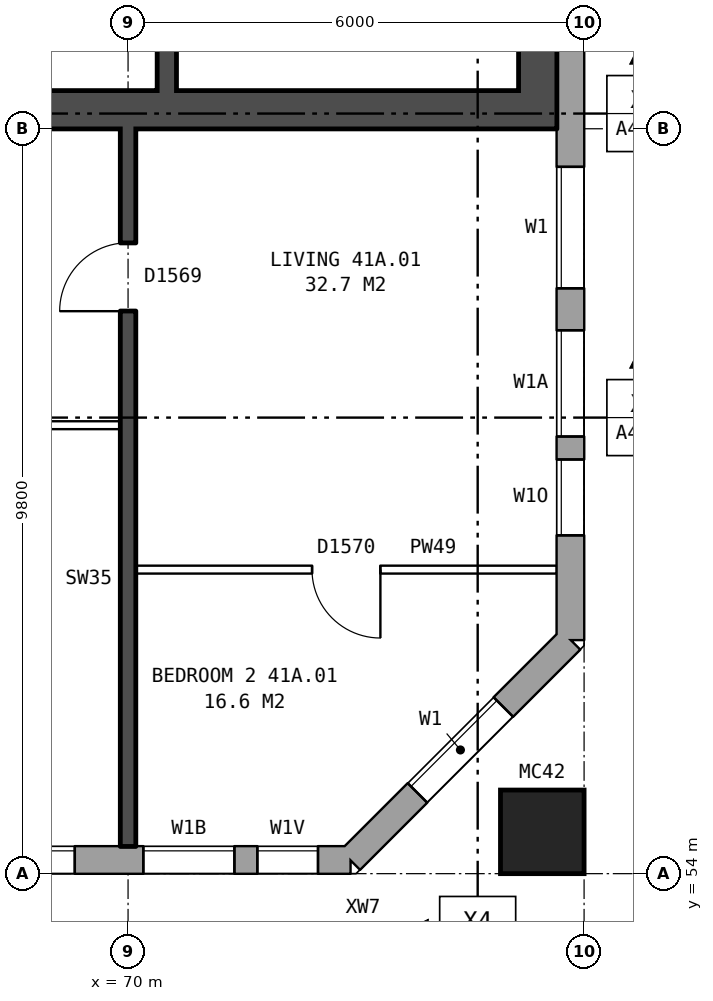
"""IFC4 building model, lengths in metres.
Left out: names, types, materials, properties, quantities, classifications, styles, units other than length and angle.
Written with IfcOpenShell. Run it as: python <this file> out.ifc"""

import sys

from ifc_helpers import new_model, si_unit, direction, frame, frame_2d, origin, origin_2d, place, context, subcontext, project, spatial, rectangle, hollow_rectangle, extrude, element, fill, save


model = new_model("IFC4")
c1 = context("Model", 3, precision=1e-05, world=origin(), true_north=direction((0.0, 1.0)))
c2 = subcontext(c1, "Body", "Model", "MODEL_VIEW")
j1 = project(units=[si_unit("LENGTHUNIT", "METRE"), si_unit("PLANEANGLEUNIT", "RADIAN")], contexts=[c1])
p1 = place(None, origin())
s1 = spatial("IfcSite", under=j1, at=p1, CompositionType="ELEMENT")
p2 = place(p1, origin())
s2 = spatial("IfcBuilding", under=s1, at=p2, CompositionType="ELEMENT")
p3 = place(p2, frame((0.0, 0.0, 148.5)))
s3 = spatial("IfcBuildingStorey", under=s2, at=p3, CompositionType="ELEMENT", Elevation=148.5)
p4 = place(p3, frame((75.45, 54.55, 0.0), z_axis=(0.0, 0.0, 1.0), x_axis=(1.0, 0.0, 0.0)))
e1 = element("IfcColumn", 1, at=p4, inside=s3, PredefinedType="COLUMN", context=c2, shape_type="SweptSolid", body=[
    extrude(hollow_rectangle(XDim=1.1, YDim=1.1, WallThickness=0.06, at=origin_2d()), origin(), (0.0, 0.0, 1.0), 3.1),
])
p5 = place(p3, frame((31.575, 54.18, 0.0), z_axis=(0.0, 0.0, 1.0), x_axis=(1.0, 0.0, 0.0)))
e2 = element("IfcWall", 2, at=p5, inside=s3, PredefinedType="STANDARD", context=c2, shape_type="SweptSolid", body=[
    extrude(rectangle(XDim=41.351, YDim=0.36, at=frame_2d((20.675, 0.0))), origin(), (0.0, 0.0, 1.0), 2.85),
])
p6 = place(p5, frame((3.125, 0.0, 0.8)))
e3 = element("IfcOpeningElement", 3, at=p6, cuts=e2, PredefinedType="OPENING", context=c2, shape_type="SweptSolid", body=[
    extrude(rectangle(XDim=1.6, YDim=1.8, at=frame_2d((0.8, 0.9))), frame((0.0, 0.19, 0.0), z_axis=(0.0, -1.0, 0.0), x_axis=(1.0, 0.0, 0.0)), (0.0, 0.0, 1.0), 0.38),
])
p7 = place(p5, frame((6.125, 0.0, 0.8)))
e4 = element("IfcOpeningElement", 4, at=p7, cuts=e2, PredefinedType="OPENING", context=c2, shape_type="SweptSolid", body=[
    extrude(rectangle(XDim=1.6, YDim=1.8, at=frame_2d((0.8, 0.9))), frame((0.0, 0.19, 0.0), z_axis=(0.0, -1.0, 0.0), x_axis=(1.0, 0.0, 0.0)), (0.0, 0.0, 1.0), 0.38),
])
p8 = place(p5, frame((9.125, 0.0, 0.8)))
e5 = element("IfcOpeningElement", 5, at=p8, cuts=e2, PredefinedType="OPENING", context=c2, shape_type="SweptSolid", body=[
    extrude(rectangle(XDim=1.6, YDim=1.8, at=frame_2d((0.8, 0.9))), frame((0.0, 0.19, 0.0), z_axis=(0.0, -1.0, 0.0), x_axis=(1.0, 0.0, 0.0)), (0.0, 0.0, 1.0), 0.38),
])
p9 = place(p5, frame((12.125, 0.0, 0.8)))
e6 = element("IfcOpeningElement", 6, at=p9, cuts=e2, PredefinedType="OPENING", context=c2, shape_type="SweptSolid", body=[
    extrude(rectangle(XDim=1.6, YDim=1.8, at=frame_2d((0.8, 0.9))), frame((0.0, 0.19, 0.0), z_axis=(0.0, -1.0, 0.0), x_axis=(1.0, 0.0, 0.0)), (0.0, 0.0, 1.0), 0.38),
])
p10 = place(p5, frame((15.125, 0.0, 0.8)))
e7 = element("IfcOpeningElement", 7, at=p10, cuts=e2, PredefinedType="OPENING", context=c2, shape_type="SweptSolid", body=[
    extrude(rectangle(XDim=1.6, YDim=1.8, at=frame_2d((0.8, 0.9))), frame((0.0, 0.19, 0.0), z_axis=(0.0, -1.0, 0.0), x_axis=(1.0, 0.0, 0.0)), (0.0, 0.0, 1.0), 0.38),
])
p11 = place(p5, frame((18.125, 0.0, 0.8)))
e8 = element("IfcOpeningElement", 8, at=p11, cuts=e2, PredefinedType="OPENING", context=c2, shape_type="SweptSolid", body=[
    extrude(rectangle(XDim=1.6, YDim=1.8, at=frame_2d((0.8, 0.9))), frame((0.0, 0.19, 0.0), z_axis=(0.0, -1.0, 0.0), x_axis=(1.0, 0.0, 0.0)), (0.0, 0.0, 1.0), 0.38),
])
p12 = place(p5, frame((21.125, 0.0, 0.8)))
e9 = element("IfcOpeningElement", 9, at=p12, cuts=e2, PredefinedType="OPENING", context=c2, shape_type="SweptSolid", body=[
    extrude(rectangle(XDim=1.6, YDim=1.8, at=frame_2d((0.8, 0.9))), frame((0.0, 0.19, 0.0), z_axis=(0.0, -1.0, 0.0), x_axis=(1.0, 0.0, 0.0)), (0.0, 0.0, 1.0), 0.38),
])
p13 = place(p5, frame((24.125, 0.0, 0.8)))
e10 = element("IfcOpeningElement", 10, at=p13, cuts=e2, PredefinedType="OPENING", context=c2, shape_type="SweptSolid", body=[
    extrude(rectangle(XDim=1.6, YDim=1.8, at=frame_2d((0.8, 0.9))), frame((0.0, 0.19, 0.0), z_axis=(0.0, -1.0, 0.0), x_axis=(1.0, 0.0, 0.0)), (0.0, 0.0, 1.0), 0.38),
])
p14 = place(p5, frame((27.125, 0.0, 0.8)))
e11 = element("IfcOpeningElement", 11, at=p14, cuts=e2, PredefinedType="OPENING", context=c2, shape_type="SweptSolid", body=[
    extrude(rectangle(XDim=1.6, YDim=1.8, at=frame_2d((0.8, 0.9))), frame((0.0, 0.19, 0.0), z_axis=(0.0, -1.0, 0.0), x_axis=(1.0, 0.0, 0.0)), (0.0, 0.0, 1.0), 0.38),
])
p15 = place(p5, frame((30.125, 0.0, 0.8)))
e12 = element("IfcOpeningElement", 12, at=p15, cuts=e2, PredefinedType="OPENING", context=c2, shape_type="SweptSolid", body=[
    extrude(rectangle(XDim=1.6, YDim=1.8, at=frame_2d((0.8, 0.9))), frame((0.0, 0.19, 0.0), z_axis=(0.0, -1.0, 0.0), x_axis=(1.0, 0.0, 0.0)), (0.0, 0.0, 1.0), 0.38),
])
p16 = place(p5, frame((33.125, 0.0, 0.8)))
e13 = element("IfcOpeningElement", 13, at=p16, cuts=e2, PredefinedType="OPENING", context=c2, shape_type="SweptSolid", body=[
    extrude(rectangle(XDim=1.6, YDim=1.8, at=frame_2d((0.8, 0.9))), frame((0.0, 0.19, 0.0), z_axis=(0.0, -1.0, 0.0), x_axis=(1.0, 0.0, 0.0)), (0.0, 0.0, 1.0), 0.38),
])
p17 = place(p5, frame((36.125, 0.0, 0.8)))
e14 = element("IfcOpeningElement", 14, at=p17, cuts=e2, PredefinedType="OPENING", context=c2, shape_type="SweptSolid", body=[
    extrude(rectangle(XDim=1.6, YDim=1.8, at=frame_2d((0.8, 0.9))), frame((0.0, 0.19, 0.0), z_axis=(0.0, -1.0, 0.0), x_axis=(1.0, 0.0, 0.0)), (0.0, 0.0, 1.0), 0.38),
])
p18 = place(p5, frame((38.625, 0.0, 0.8)))
e15 = element("IfcOpeningElement", 15, at=p18, cuts=e2, PredefinedType="OPENING", context=c2, shape_type="SweptSolid", body=[
    extrude(rectangle(XDim=1.2, YDim=1.8, at=frame_2d((0.6, 0.9))), frame((0.0, 0.19, 0.0), z_axis=(0.0, -1.0, 0.0), x_axis=(1.0, 0.0, 0.0)), (0.0, 0.0, 1.0), 0.38),
])
p19 = place(p5, frame((40.125, 0.0, 0.8)))
e16 = element("IfcOpeningElement", 16, at=p19, cuts=e2, PredefinedType="OPENING", context=c2, shape_type="SweptSolid", body=[
    extrude(rectangle(XDim=0.8, YDim=0.9, at=frame_2d((0.4, 0.45))), frame((0.0, 0.19, 0.0), z_axis=(0.0, -1.0, 0.0), x_axis=(1.0, 0.0, 0.0)), (0.0, 0.0, 1.0), 0.38),
])
p20 = place(p3, frame((72.925, 54.18, 0.0), z_axis=(0.0, 0.0, 1.0), x_axis=(0.707106781187, 0.707106781187, 0.0)))
e17 = element("IfcWall", 17, at=p20, inside=s3, PredefinedType="STANDARD", context=c2, shape_type="SweptSolid", body=[
    extrude(rectangle(XDim=4.094, YDim=0.36, at=frame_2d((2.047, 0.0))), origin(), (0.0, 0.0, 1.0), 2.85),
])
p21 = place(p20, frame((1.247, 0.0, 0.8)))
e18 = element("IfcOpeningElement", 18, at=p21, cuts=e17, PredefinedType="OPENING", context=c2, shape_type="SweptSolid", body=[
    extrude(rectangle(XDim=1.6, YDim=1.8, at=frame_2d((0.8, 0.9))), frame((0.0, 0.19, 0.0), z_axis=(0.0, -1.0, 0.0), x_axis=(1.0, 0.0, 0.0)), (0.0, 0.0, 1.0), 0.38),
])
p22 = place(p3, frame((75.82, 57.075, 0.0), z_axis=(0.0, 0.0, 1.0), x_axis=(0.0, 1.0, 0.0)))
e19 = element("IfcWall", 19, at=p22, inside=s3, PredefinedType="STANDARD", context=c2, shape_type="SweptSolid", body=[
    extrude(rectangle(XDim=25.851, YDim=0.36, at=frame_2d((12.925, 0.0))), origin(), (0.0, 0.0, 1.0), 2.85),
])
p23 = place(p22, frame((1.375, 0.0, 0.8)))
e20 = element("IfcOpeningElement", 20, at=p23, cuts=e19, PredefinedType="OPENING", context=c2, shape_type="SweptSolid", body=[
    extrude(rectangle(XDim=1.0, YDim=1.2, at=frame_2d((0.5, 0.6))), frame((0.0, 0.19, 0.0), z_axis=(0.0, -1.0, 0.0), x_axis=(1.0, 0.0, 0.0)), (0.0, 0.0, 1.0), 0.38),
])
p24 = place(p22, frame((4.625, 0.0, 0.8)))
e21 = element("IfcOpeningElement", 21, at=p24, cuts=e19, PredefinedType="OPENING", context=c2, shape_type="SweptSolid", body=[
    extrude(rectangle(XDim=1.6, YDim=1.8, at=frame_2d((0.8, 0.9))), frame((0.0, 0.19, 0.0), z_axis=(0.0, -1.0, 0.0), x_axis=(1.0, 0.0, 0.0)), (0.0, 0.0, 1.0), 0.38),
])
p25 = place(p22, frame((19.625, 0.0, 0.8)))
e22 = element("IfcOpeningElement", 22, at=p25, cuts=e19, PredefinedType="OPENING", context=c2, shape_type="SweptSolid", body=[
    extrude(rectangle(XDim=1.6, YDim=1.8, at=frame_2d((0.8, 0.9))), frame((0.0, 0.19, 0.0), z_axis=(0.0, -1.0, 0.0), x_axis=(1.0, 0.0, 0.0)), (0.0, 0.0, 1.0), 0.38),
])
p26 = place(p22, frame((22.075, 0.0, 0.8)))
e23 = element("IfcOpeningElement", 23, at=p26, cuts=e19, PredefinedType="OPENING", context=c2, shape_type="SweptSolid", body=[
    extrude(rectangle(XDim=1.2, YDim=1.8, at=frame_2d((0.6, 0.9))), frame((0.0, 0.19, 0.0), z_axis=(0.0, -1.0, 0.0), x_axis=(1.0, 0.0, 0.0)), (0.0, 0.0, 1.0), 0.38),
])
p27 = place(p22, frame((2.675, 0.0, 0.8)))
e24 = element("IfcOpeningElement", 24, at=p27, cuts=e19, PredefinedType="OPENING", context=c2, shape_type="SweptSolid", body=[
    extrude(rectangle(XDim=1.4, YDim=1.8, at=frame_2d((0.7, 0.9))), frame((0.0, 0.19, 0.0), z_axis=(0.0, -1.0, 0.0), x_axis=(1.0, 0.0, 0.0)), (0.0, 0.0, 1.0), 0.38),
])
p28 = place(p22, frame((23.575, 0.0, 0.8)))
e25 = element("IfcOpeningElement", 25, at=p28, cuts=e19, PredefinedType="OPENING", context=c2, shape_type="SweptSolid", body=[
    extrude(rectangle(XDim=1.4, YDim=0.9, at=frame_2d((0.7, 0.45))), frame((0.0, 0.19, 0.0), z_axis=(0.0, -1.0, 0.0), x_axis=(1.0, 0.0, 0.0)), (0.0, 0.0, 1.0), 0.38),
])
p29 = place(p3, frame((75.39, 63.8, 0.0), z_axis=(0.0, 0.0, 1.0), x_axis=(0.0, 1.0, 0.0)))
e26 = element("IfcWall", 26, at=p29, inside=s3, PredefinedType="SHEAR", context=c2, shape_type="SweptSolid", body=[
    extrude(rectangle(XDim=12.4, YDim=0.5, at=frame_2d((6.2, 0.0))), origin(), (0.0, 0.0, 1.0), 2.85),
])
p30 = place(p3, frame((67.14, 64.05, 0.0), z_axis=(0.0, 0.0, 1.0), x_axis=(1.0, 0.0, 0.0)))
e27 = element("IfcWall", 27, at=p30, inside=s3, PredefinedType="SHEAR", context=c2, shape_type="SweptSolid", body=[
    extrude(rectangle(XDim=8.0, YDim=0.5, at=frame_2d((4.0, 0.0))), origin(), (0.0, 0.0, 1.0), 2.85),
])
p31 = place(p3, frame((70.51, 64.3, 0.0), z_axis=(0.0, 0.0, 1.0), x_axis=(0.0, 1.0, 0.0)))
e28 = element("IfcWall", 28, at=p31, inside=s3, PredefinedType="SHEAR", context=c2, shape_type="SweptSolid", body=[
    extrude(rectangle(XDim=2.425, YDim=0.25, at=frame_2d((1.212, 0.0))), origin(), (0.0, 0.0, 1.0), 2.85),
])
p32 = place(p3, frame((70.1, 58.0, 0.0), z_axis=(0.0, 0.0, 1.0), x_axis=(1.0, 0.0, 0.0)))
e29 = element("IfcWall", 29, at=p32, inside=s3, PredefinedType="PARTITIONING", context=c2, shape_type="SweptSolid", body=[
    extrude(rectangle(XDim=5.54, YDim=0.1, at=frame_2d((2.77, 0.0))), origin(), (0.0, 0.0, 1.0), 2.85),
])
p33 = place(p32, frame((2.32, 0.0, 0.0)))
e30 = element("IfcOpeningElement", 30, at=p33, cuts=e29, PredefinedType="OPENING", context=c2, shape_type="SweptSolid", body=[
    extrude(rectangle(XDim=0.9, YDim=2.1, at=frame_2d((0.45, 1.05))), frame((0.0, 0.06, 0.0), z_axis=(0.0, -1.0, 0.0), x_axis=(1.0, 0.0, 0.0)), (0.0, 0.0, 1.0), 0.12),
])
p34 = place(p3, frame((64.1, 59.9, 0.0), z_axis=(0.0, 0.0, 1.0), x_axis=(1.0, 0.0, 0.0)))
e31 = element("IfcWall", 31, at=p34, inside=s3, PredefinedType="PARTITIONING", context=c2, shape_type="SweptSolid", body=[
    extrude(rectangle(XDim=5.8, YDim=0.1, at=frame_2d((2.9, 0.0))), origin(), (0.0, 0.0, 1.0), 2.85),
])
p35 = place(p34, frame((3.6, 0.0, 0.0)))
e32 = element("IfcOpeningElement", 32, at=p35, cuts=e31, PredefinedType="OPENING", context=c2, shape_type="SweptSolid", body=[
    extrude(rectangle(XDim=0.9, YDim=2.1, at=frame_2d((0.45, 1.05))), frame((0.0, 0.06, 0.0), z_axis=(0.0, -1.0, 0.0), x_axis=(1.0, 0.0, 0.0)), (0.0, 0.0, 1.0), 0.12),
])
p36 = place(p34, frame((0.7, 0.0, 0.0)))
e33 = element("IfcOpeningElement", 33, at=p36, cuts=e31, PredefinedType="OPENING", context=c2, shape_type="SweptSolid", body=[
    extrude(rectangle(XDim=0.9, YDim=2.1, at=frame_2d((0.45, 1.05))), frame((0.0, 0.06, 0.0), z_axis=(0.0, -1.0, 0.0), x_axis=(1.0, 0.0, 0.0)), (0.0, 0.0, 1.0), 0.12),
])
p37 = place(p3, frame((70.0, 54.36, 0.0), z_axis=(0.0, 0.0, 1.0), x_axis=(0.0, 1.0, 0.0)))
e34 = element("IfcWall", 34, at=p37, inside=s3, PredefinedType="SOLIDWALL", context=c2, shape_type="SweptSolid", body=[
    extrude(rectangle(XDim=9.44, YDim=0.2, at=frame_2d((4.72, 0.0))), origin(), (0.0, 0.0, 1.0), 2.85),
])
p38 = place(p37, frame((7.04, 0.0, 0.0)))
e35 = element("IfcOpeningElement", 35, at=p38, cuts=e34, PredefinedType="OPENING", context=c2, shape_type="SweptSolid", body=[
    extrude(rectangle(XDim=0.9, YDim=2.1, at=frame_2d((0.45, 1.05))), frame((0.0, 0.11, 0.0), z_axis=(0.0, -1.0, 0.0), x_axis=(1.0, 0.0, 0.0)), (0.0, 0.0, 1.0), 0.22),
])
p39 = place(p17, origin())
e36 = element("IfcWindow", 36, at=p39, inside=s3, PartitioningType="SINGLE_PANEL", PredefinedType="WINDOW", context=c2, shape_type="SweptSolid", body=[
    extrude(rectangle(XDim=1.6, YDim=1.8, at=frame_2d((0.8, 0.9))), frame((0.0, 0.15, 0.0), z_axis=(0.0, -1.0, 0.0), x_axis=(1.0, 0.0, 0.0)), (0.0, 0.0, 1.0), 0.06),
])
fill(e14, e36)
p40 = place(p18, origin())
e37 = element("IfcWindow", 37, at=p40, inside=s3, PartitioningType="SINGLE_PANEL", PredefinedType="WINDOW", context=c2, shape_type="SweptSolid", body=[
    extrude(rectangle(XDim=1.2, YDim=1.8, at=frame_2d((0.6, 0.9))), frame((0.0, 0.15, 0.0), z_axis=(0.0, -1.0, 0.0), x_axis=(1.0, 0.0, 0.0)), (0.0, 0.0, 1.0), 0.06),
])
fill(e15, e37)
p41 = place(p21, origin())
e38 = element("IfcWindow", 38, at=p41, inside=s3, PartitioningType="SINGLE_PANEL", PredefinedType="WINDOW", context=c2, shape_type="SweptSolid", body=[
    extrude(rectangle(XDim=1.6, YDim=1.8, at=frame_2d((0.8, 0.9))), frame((0.0, 0.15, 0.0), z_axis=(0.0, -1.0, 0.0), x_axis=(1.0, 0.0, 0.0)), (0.0, 0.0, 1.0), 0.06),
])
fill(e18, e38)
p42 = place(p23, origin())
e39 = element("IfcWindow", 39, at=p42, inside=s3, PartitioningType="SINGLE_PANEL", PredefinedType="WINDOW", context=c2, shape_type="SweptSolid", body=[
    extrude(rectangle(XDim=1.0, YDim=1.2, at=frame_2d((0.5, 0.6))), frame((0.0, 0.15, 0.0), z_axis=(0.0, -1.0, 0.0), x_axis=(1.0, 0.0, 0.0)), (0.0, 0.0, 1.0), 0.06),
])
fill(e20, e39)
p43 = place(p24, origin())
e40 = element("IfcWindow", 40, at=p43, inside=s3, PartitioningType="SINGLE_PANEL", PredefinedType="WINDOW", context=c2, shape_type="SweptSolid", body=[
    extrude(rectangle(XDim=1.6, YDim=1.8, at=frame_2d((0.8, 0.9))), frame((0.0, 0.15, 0.0), z_axis=(0.0, -1.0, 0.0), x_axis=(1.0, 0.0, 0.0)), (0.0, 0.0, 1.0), 0.06),
])
fill(e21, e40)
p44 = place(p33, frame((0.9, 0.0, 0.0), z_axis=(0.0, 0.0, 1.0), x_axis=(-1.0, 0.0, 0.0)))
e41 = element("IfcDoor", 41, at=p44, inside=s3, OperationType="SINGLE_SWING_LEFT", PredefinedType="DOOR", context=c2, shape_type="SweptSolid", body=[
    extrude(rectangle(XDim=0.9, YDim=2.1, at=frame_2d((0.45, 1.05))), frame((0.0, 0.025, 0.0), z_axis=(0.0, -1.0, 0.0), x_axis=(1.0, 0.0, 0.0)), (0.0, 0.0, 1.0), 0.05),
])
fill(e30, e41)
p45 = place(p38, origin())
e42 = element("IfcDoor", 42, at=p45, inside=s3, OperationType="SINGLE_SWING_LEFT", PredefinedType="DOOR", context=c2, shape_type="SweptSolid", body=[
    extrude(rectangle(XDim=0.9, YDim=2.1, at=frame_2d((0.45, 1.05))), frame((0.0, 0.025, 0.0), z_axis=(0.0, -1.0, 0.0), x_axis=(1.0, 0.0, 0.0)), (0.0, 0.0, 1.0), 0.05),
])
fill(e35, e42)
p46 = place(p19, origin())
e43 = element("IfcWindow", 43, at=p46, inside=s3, PartitioningType="SINGLE_PANEL", PredefinedType="WINDOW", context=c2, shape_type="SweptSolid", body=[
    extrude(rectangle(XDim=0.8, YDim=0.9, at=frame_2d((0.4, 0.45))), frame((0.0, 0.15, 0.0), z_axis=(0.0, -1.0, 0.0), x_axis=(1.0, 0.0, 0.0)), (0.0, 0.0, 1.0), 0.06),
])
fill(e16, e43)
p47 = place(p27, origin())
e44 = element("IfcWindow", 44, at=p47, inside=s3, PartitioningType="SINGLE_PANEL", PredefinedType="WINDOW", context=c2, shape_type="SweptSolid", body=[
    extrude(rectangle(XDim=1.4, YDim=1.8, at=frame_2d((0.7, 0.9))), frame((0.0, 0.15, 0.0), z_axis=(0.0, -1.0, 0.0), x_axis=(1.0, 0.0, 0.0)), (0.0, 0.0, 1.0), 0.06),
])
fill(e24, e44)
save(model, sys.argv[1])
